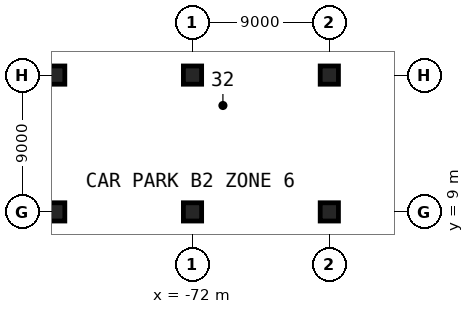
"""IFC4 building model, lengths in metres.
Left out: names, types, materials, properties, quantities, classifications, styles, units other than length and angle.
Written with IfcOpenShell. Run it as: python <this file> out.ifc"""

import sys

from ifc_helpers import new_model, si_unit, direction, frame, origin, origin_2d, place, context, subcontext, project, spatial, rectangle, extrude, element, save


model = new_model("IFC4")
c1 = context("Model", 3, precision=1e-05, world=origin(), true_north=direction((0.0, 1.0)))
c2 = subcontext(c1, "Body", "Model", "MODEL_VIEW")
j1 = project(units=[si_unit("LENGTHUNIT", "METRE"), si_unit("PLANEANGLEUNIT", "RADIAN")], contexts=[c1])
p1 = place(None, origin())
s1 = spatial("IfcSite", under=j1, at=p1, CompositionType="ELEMENT")
p2 = place(p1, origin())
s2 = spatial("IfcBuilding", under=s1, at=p2, CompositionType="ELEMENT")
p3 = place(p2, frame((0.0, 0.0, -9.0)))
s3 = spatial("IfcBuildingStorey", under=s2, at=p3, CompositionType="ELEMENT", Elevation=-9.0)
for number, where, z_axis, x_axis in (
    (1, (-81.0, 9.0, 0.0), (0.0, 0.0, 1.0), (1.0, 0.0, 0.0)),
    (2, (-81.0, 18.0, 0.0), (0.0, 0.0, 1.0), (1.0, 0.0, 0.0)),
    (3, (-72.0, 9.0, 0.0), (0.0, 0.0, 1.0), (1.0, 0.0, 0.0)),
    (4, (-72.0, 18.0, 0.0), (0.0, 0.0, 1.0), (1.0, 0.0, 0.0)),
    (5, (-63.0, 9.0, 0.0), (0.0, 0.0, 1.0), (1.0, 0.0, 0.0)),
    (6, (-63.0, 18.0, 0.0), (0.0, 0.0, 1.0), (1.0, 0.0, 0.0)),
):
    element("IfcColumn", number, at=place(p3, frame(where, z_axis=z_axis, x_axis=x_axis)), inside=s3, PredefinedType="COLUMN", context=c2, shape_type="SweptSolid", body=[
        extrude(rectangle(XDim=1.2, YDim=1.2, at=origin_2d()), origin(), (0.0, 0.0, 1.0), 4.5),
    ])
save(model, sys.argv[1])
